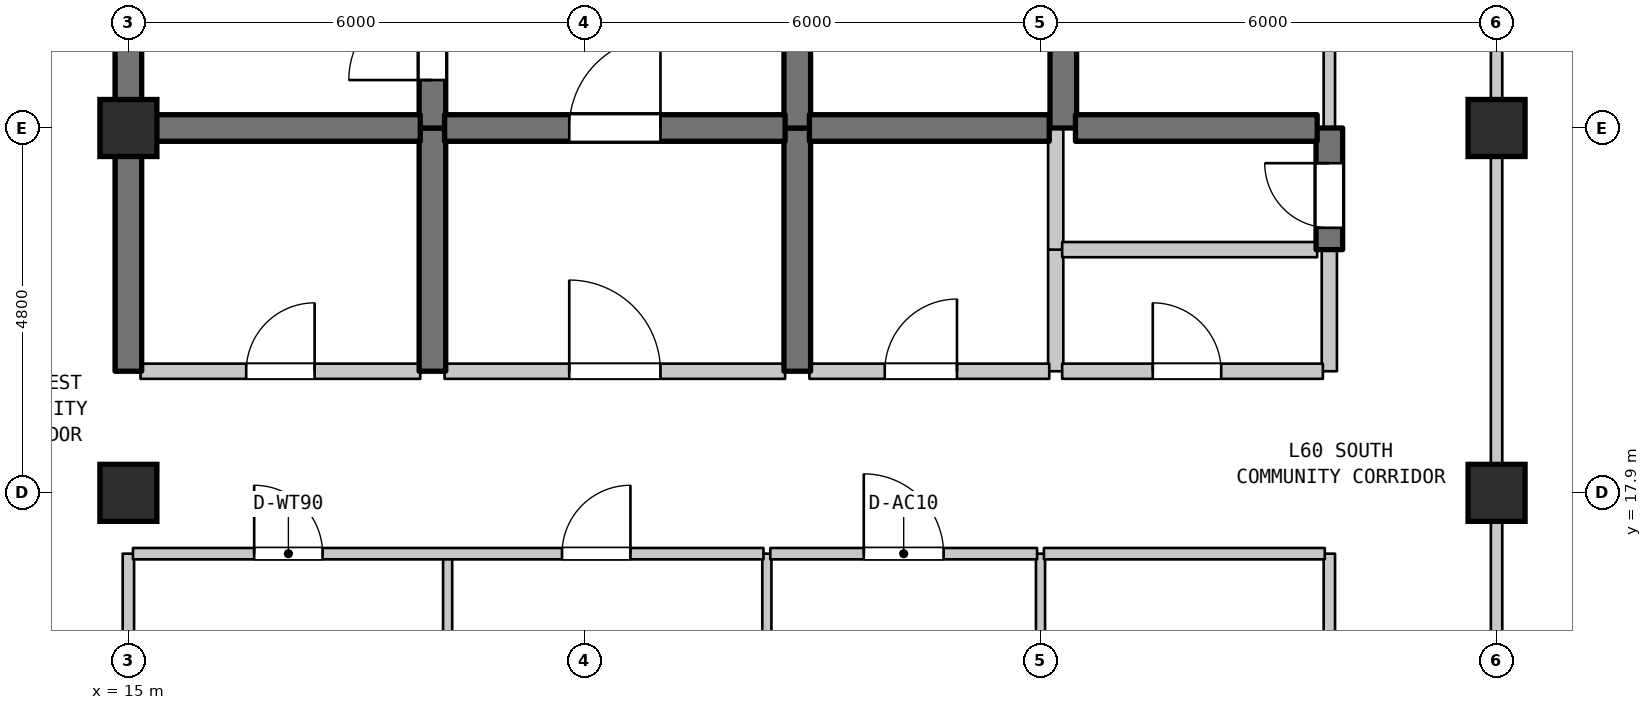
"""IFC4 building model, lengths in metres.
Left out: names, types, materials, properties, quantities, classifications, styles, units other than length and angle.
Written with IfcOpenShell. Run it as: python <this file> out.ifc"""

import sys

from ifc_helpers import new_model, si_unit, direction, frame, frame_2d, origin, origin_2d, place, context, subcontext, project, spatial, rectangle, extrude, element, fill, save


model = new_model("IFC4")
c1 = context("Model", 3, precision=1e-05, world=origin(), true_north=direction((0.0, 1.0)))
c2 = subcontext(c1, "Body", "Model", "MODEL_VIEW")
j1 = project(units=[si_unit("LENGTHUNIT", "METRE"), si_unit("PLANEANGLEUNIT", "RADIAN")], contexts=[c1])
p1 = place(None, origin())
s1 = spatial("IfcSite", under=j1, at=p1, CompositionType="ELEMENT")
p2 = place(p1, origin())
s2 = spatial("IfcBuilding", under=s1, at=p2, CompositionType="ELEMENT")
p3 = place(p2, frame((0.0, 0.0, 242.8)))
s3 = spatial("IfcBuildingStorey", under=s2, at=p3, CompositionType="ELEMENT", Elevation=242.8)
for number, where, z_axis, x_axis in (
    (1, (15.0, 17.9, 0.0), (0.0, 0.0, 1.0), (1.0, 0.0, 0.0)),
    (2, (15.0, 22.7, 0.0), (0.0, 0.0, 1.0), (1.0, 0.0, 0.0)),
    (3, (33.0, 17.9, 0.0), (0.0, 0.0, 1.0), (1.0, 0.0, 0.0)),
    (4, (33.0, 22.7, 0.0), (0.0, 0.0, 1.0), (1.0, 0.0, 0.0)),
):
    element("IfcColumn", number, at=place(p3, frame(where, z_axis=z_axis, x_axis=x_axis)), inside=s3, PredefinedType="COLUMN", context=c2, shape_type="SweptSolid", body=[
        extrude(rectangle(XDim=0.75, YDim=0.75, at=origin_2d()), origin(), (0.0, 0.0, 1.0), 4.5),
    ])
p4 = place(p3, frame((15.0, 13.0, 0.0), z_axis=(0.0, 0.0, 1.0), x_axis=(0.0, 1.0, 0.0)))
e5 = element("IfcWall", 5, at=p4, inside=s3, PredefinedType="STANDARD", context=c2, shape_type="SweptSolid", body=[
    extrude(rectangle(XDim=4.1, YDim=0.15, at=frame_2d((2.05, 0.0))), origin(), (0.0, 0.0, 1.0), 3.9),
])
p5 = place(p3, frame((15.0, 19.5, 0.0), z_axis=(0.0, 0.0, 1.0), x_axis=(0.0, 1.0, 0.0)))
e6 = element("IfcWall", 6, at=p5, inside=s3, PredefinedType="SHEAR", context=c2, shape_type="SweptSolid", body=[
    extrude(rectangle(XDim=3.2, YDim=0.35, at=frame_2d((1.6, 0.0))), origin(), (0.0, 0.0, 1.0), 4.19),
])
p6 = place(p3, frame((15.0, 22.7, 0.0), z_axis=(0.0, 0.0, 1.0), x_axis=(0.0, 1.0, 0.0)))
e7 = element("IfcWall", 7, at=p6, inside=s3, PredefinedType="SHEAR", context=c2, shape_type="SweptSolid", body=[
    extrude(rectangle(XDim=6.8, YDim=0.35, at=frame_2d((3.4, 0.0))), origin(), (0.0, 0.0, 1.0), 4.19),
])
p7 = place(p3, frame((19.0, 19.5, 0.0), z_axis=(0.0, 0.0, 1.0), x_axis=(0.0, 1.0, 0.0)))
e8 = element("IfcWall", 8, at=p7, inside=s3, PredefinedType="SHEAR", context=c2, shape_type="SweptSolid", body=[
    extrude(rectangle(XDim=3.2, YDim=0.35, at=frame_2d((1.6, 0.0))), origin(), (0.0, 0.0, 1.0), 4.19),
])
p8 = place(p3, frame((19.0, 22.7, 0.0), z_axis=(0.0, 0.0, 1.0), x_axis=(0.0, 1.0, 0.0)))
e9 = element("IfcWall", 9, at=p8, inside=s3, PredefinedType="SHEAR", context=c2, shape_type="SweptSolid", body=[
    extrude(rectangle(XDim=5.5, YDim=0.35, at=frame_2d((2.75, 0.0))), origin(), (0.0, 0.0, 1.0), 4.19),
])
p9 = place(p8, frame((0.631, 0.0, 0.0)))
e10 = element("IfcOpeningElement", 10, at=p9, cuts=e9, PredefinedType="OPENING", context=c2, shape_type="SweptSolid", body=[
    extrude(rectangle(XDim=1.1, YDim=2.15, at=frame_2d((0.55, 1.075))), frame((0.0, 0.185, 0.0), z_axis=(0.0, -1.0, 0.0), x_axis=(1.0, 0.0, 0.0)), (0.0, 0.0, 1.0), 0.37),
])
for number, where, z_axis, x_axis in (
    (11, (19.2, 13.0, 0.0), (0.0, 0.0, 1.0), (0.0, 1.0, 0.0)),
    (12, (23.4, 13.0, 0.0), (0.0, 0.0, 1.0), (0.0, 1.0, 0.0)),
):
    element("IfcWall", number, at=place(p3, frame(where, z_axis=z_axis, x_axis=x_axis)), inside=s3, PredefinedType="PARTITIONING", context=c2, shape_type="SweptSolid", body=[
        extrude(rectangle(XDim=4.1, YDim=0.12, at=frame_2d((2.05, 0.0))), origin(), (0.0, 0.0, 1.0), 4.19),
    ])
p10 = place(p3, frame((23.8, 19.5, 0.0), z_axis=(0.0, 0.0, 1.0), x_axis=(0.0, 1.0, 0.0)))
e13 = element("IfcWall", 13, at=p10, inside=s3, PredefinedType="SHEAR", context=c2, shape_type="SweptSolid", body=[
    extrude(rectangle(XDim=3.2, YDim=0.35, at=frame_2d((1.6, 0.0))), origin(), (0.0, 0.0, 1.0), 4.19),
])
p11 = place(p3, frame((23.8, 22.7, 0.0), z_axis=(0.0, 0.0, 1.0), x_axis=(0.0, 1.0, 0.0)))
e14 = element("IfcWall", 14, at=p11, inside=s3, PredefinedType="SHEAR", context=c2, shape_type="SweptSolid", body=[
    extrude(rectangle(XDim=3.4, YDim=0.35, at=frame_2d((1.7, 0.0))), origin(), (0.0, 0.0, 1.0), 4.19),
])
p12 = place(p11, frame((1.25, 0.0, 0.0)))
e15 = element("IfcOpeningElement", 15, at=p12, cuts=e14, PredefinedType="OPENING", context=c2, shape_type="SweptSolid", body=[
    extrude(rectangle(XDim=0.9, YDim=2.15, at=frame_2d((0.45, 1.075))), frame((0.0, 0.185, 0.0), z_axis=(0.0, -1.0, 0.0), x_axis=(1.0, 0.0, 0.0)), (0.0, 0.0, 1.0), 0.37),
])
p13 = place(p3, frame((27.0, 14.5, 0.0), z_axis=(0.0, 0.0, 1.0), x_axis=(0.0, 1.0, 0.0)))
e16 = element("IfcWall", 16, at=p13, inside=s3, PredefinedType="PARTITIONING", context=c2, shape_type="SweptSolid", body=[
    extrude(rectangle(XDim=2.6, YDim=0.12, at=frame_2d((1.3, 0.0))), origin(), (0.0, 0.0, 1.0), 4.19),
])
p14 = place(p3, frame((27.2, 19.5, 0.0), z_axis=(0.0, 0.0, 1.0), x_axis=(0.0, 1.0, 0.0)))
e17 = element("IfcWall", 17, at=p14, inside=s3, PredefinedType="STANDARD", context=c2, shape_type="SweptSolid", body=[
    extrude(rectangle(XDim=1.6, YDim=0.2, at=frame_2d((0.8, 0.0))), origin(), (0.0, 0.0, 1.0), 4.19),
])
p15 = place(p3, frame((27.2, 21.1, 0.0), z_axis=(0.0, 0.0, 1.0), x_axis=(0.0, 1.0, 0.0)))
e18 = element("IfcWall", 18, at=p15, inside=s3, PredefinedType="STANDARD", context=c2, shape_type="SweptSolid", body=[
    extrude(rectangle(XDim=1.6, YDim=0.2, at=frame_2d((0.8, 0.0))), origin(), (0.0, 0.0, 1.0), 4.19),
])
p16 = place(p3, frame((27.3, 22.7, 0.0), z_axis=(0.0, 0.0, 1.0), x_axis=(0.0, 1.0, 0.0)))
e19 = element("IfcWall", 19, at=p16, inside=s3, PredefinedType="SHEAR", context=c2, shape_type="SweptSolid", body=[
    extrude(rectangle(XDim=2.9, YDim=0.35, at=frame_2d((1.45, 0.0))), origin(), (0.0, 0.0, 1.0), 4.19),
])
p17 = place(p3, frame((30.8, 14.5, 0.0), z_axis=(0.0, 0.0, 1.0), x_axis=(0.0, 1.0, 0.0)))
e20 = element("IfcWall", 20, at=p17, inside=s3, PredefinedType="STANDARD", context=c2, shape_type="SweptSolid", body=[
    extrude(rectangle(XDim=2.6, YDim=0.15, at=frame_2d((1.3, 0.0))), origin(), (0.0, 0.0, 1.0), 4.19),
])
p18 = place(p3, frame((30.8, 19.5, 0.0), z_axis=(0.0, 0.0, 1.0), x_axis=(0.0, 1.0, 0.0)))
e21 = element("IfcWall", 21, at=p18, inside=s3, PredefinedType="STANDARD", context=c2, shape_type="SweptSolid", body=[
    extrude(rectangle(XDim=1.6, YDim=0.2, at=frame_2d((0.8, 0.0))), origin(), (0.0, 0.0, 1.0), 4.19),
])
p19 = place(p3, frame((30.8, 21.1, 0.0), z_axis=(0.0, 0.0, 1.0), x_axis=(0.0, 1.0, 0.0)))
e22 = element("IfcWall", 22, at=p19, inside=s3, PredefinedType="SHEAR", context=c2, shape_type="SweptSolid", body=[
    extrude(rectangle(XDim=1.6, YDim=0.35, at=frame_2d((0.8, 0.0))), origin(), (0.0, 0.0, 1.0), 4.19),
])
p20 = place(p19, frame((0.287, 0.0, 0.0)))
e23 = element("IfcOpeningElement", 23, at=p20, cuts=e22, PredefinedType="OPENING", context=c2, shape_type="SweptSolid", body=[
    extrude(rectangle(XDim=0.85, YDim=2.1, at=frame_2d((0.425, 1.05))), frame((0.0, 0.185, 0.0), z_axis=(0.0, -1.0, 0.0), x_axis=(1.0, 0.0, 0.0)), (0.0, 0.0, 1.0), 0.37),
])
p21 = place(p3, frame((30.8, 22.7, 0.0), z_axis=(0.0, 0.0, 1.0), x_axis=(0.0, 1.0, 0.0)))
e24 = element("IfcWall", 24, at=p21, inside=s3, PredefinedType="STANDARD", context=c2, shape_type="SweptSolid", body=[
    extrude(rectangle(XDim=2.9, YDim=0.15, at=frame_2d((1.45, 0.0))), origin(), (0.0, 0.0, 1.0), 4.19),
])
p22 = place(p3, frame((33.0, 6.71, 0.0), z_axis=(0.0, 0.0, 1.0), x_axis=(0.0, 1.0, 0.0)))
e25 = element("IfcWall", 25, at=p22, inside=s3, PredefinedType="STANDARD", context=c2, shape_type="SweptSolid", body=[
    extrude(rectangle(XDim=19.19, YDim=0.15, at=frame_2d((9.595, 0.0))), origin(), (0.0, 0.0, 1.0), 3.9),
])
p23 = place(p3, frame((15.06, 17.1, 0.0), z_axis=(0.0, 0.0, 1.0), x_axis=(1.0, 0.0, 0.0)))
e26 = element("IfcWall", 26, at=p23, inside=s3, PredefinedType="STANDARD", context=c2, shape_type="SweptSolid", body=[
    extrude(rectangle(XDim=8.295, YDim=0.15, at=frame_2d((4.147, 0.0))), origin(), (0.0, 0.0, 1.0), 4.19),
])
p24 = place(p23, frame((1.595, 0.0, 0.0)))
e27 = element("IfcOpeningElement", 27, at=p24, cuts=e26, PredefinedType="OPENING", context=c2, shape_type="SweptSolid", body=[
    extrude(rectangle(XDim=0.9, YDim=2.1, at=frame_2d((0.45, 1.05))), frame((0.0, 0.085, 0.0), z_axis=(0.0, -1.0, 0.0), x_axis=(1.0, 0.0, 0.0)), (0.0, 0.0, 1.0), 0.17),
])
p25 = place(p23, frame((5.645, 0.0, 0.0)))
e28 = element("IfcOpeningElement", 28, at=p25, cuts=e26, PredefinedType="OPENING", context=c2, shape_type="SweptSolid", body=[
    extrude(rectangle(XDim=0.9, YDim=2.1, at=frame_2d((0.45, 1.05))), frame((0.0, 0.085, 0.0), z_axis=(0.0, -1.0, 0.0), x_axis=(1.0, 0.0, 0.0)), (0.0, 0.0, 1.0), 0.17),
])
p26 = place(p3, frame((23.445, 17.1, 0.0), z_axis=(0.0, 0.0, 1.0), x_axis=(1.0, 0.0, 0.0)))
e29 = element("IfcWall", 29, at=p26, inside=s3, PredefinedType="STANDARD", context=c2, shape_type="SweptSolid", body=[
    extrude(rectangle(XDim=3.51, YDim=0.15, at=frame_2d((1.755, 0.0))), origin(), (0.0, 0.0, 1.0), 4.19),
])
p27 = place(p26, frame((1.23, 0.0, 0.0)))
e30 = element("IfcOpeningElement", 30, at=p27, cuts=e29, PredefinedType="OPENING", context=c2, shape_type="SweptSolid", body=[
    extrude(rectangle(XDim=1.05, YDim=2.15, at=frame_2d((0.525, 1.075))), frame((0.0, 0.085, 0.0), z_axis=(0.0, -1.0, 0.0), x_axis=(1.0, 0.0, 0.0)), (0.0, 0.0, 1.0), 0.17),
])
p28 = place(p3, frame((27.045, 17.1, 0.0), z_axis=(0.0, 0.0, 1.0), x_axis=(1.0, 0.0, 0.0)))
e31 = element("IfcWall", 31, at=p28, inside=s3, PredefinedType="STANDARD", context=c2, shape_type="SweptSolid", body=[
    extrude(rectangle(XDim=3.695, YDim=0.15, at=frame_2d((1.848, 0.0))), origin(), (0.0, 0.0, 1.0), 4.19),
])
p29 = place(p3, frame((15.16, 19.5, 0.0), z_axis=(0.0, 0.0, 1.0), x_axis=(1.0, 0.0, 0.0)))
e32 = element("IfcWall", 32, at=p29, inside=s3, PredefinedType="STANDARD", context=c2, shape_type="SweptSolid", body=[
    extrude(rectangle(XDim=3.68, YDim=0.2, at=frame_2d((1.84, 0.0))), origin(), (0.0, 0.0, 1.0), 4.19),
])
p30 = place(p29, frame((1.39, 0.0, 0.0)))
e33 = element("IfcOpeningElement", 33, at=p30, cuts=e32, PredefinedType="OPENING", context=c2, shape_type="SweptSolid", body=[
    extrude(rectangle(XDim=0.9, YDim=2.15, at=frame_2d((0.45, 1.075))), frame((0.0, 0.11, 0.0), z_axis=(0.0, -1.0, 0.0), x_axis=(1.0, 0.0, 0.0)), (0.0, 0.0, 1.0), 0.22),
])
p31 = place(p3, frame((19.16, 19.5, 0.0), z_axis=(0.0, 0.0, 1.0), x_axis=(1.0, 0.0, 0.0)))
e34 = element("IfcWall", 34, at=p31, inside=s3, PredefinedType="STANDARD", context=c2, shape_type="SweptSolid", body=[
    extrude(rectangle(XDim=4.48, YDim=0.2, at=frame_2d((2.24, 0.0))), origin(), (0.0, 0.0, 1.0), 4.19),
])
p32 = place(p31, frame((1.64, 0.0, 0.0)))
e35 = element("IfcOpeningElement", 35, at=p32, cuts=e34, PredefinedType="OPENING", context=c2, shape_type="SweptSolid", body=[
    extrude(rectangle(XDim=1.2, YDim=2.2, at=frame_2d((0.6, 1.1))), frame((0.0, 0.11, 0.0), z_axis=(0.0, -1.0, 0.0), x_axis=(1.0, 0.0, 0.0)), (0.0, 0.0, 1.0), 0.22),
])
p33 = place(p3, frame((23.96, 19.5, 0.0), z_axis=(0.0, 0.0, 1.0), x_axis=(1.0, 0.0, 0.0)))
e36 = element("IfcWall", 36, at=p33, inside=s3, PredefinedType="STANDARD", context=c2, shape_type="SweptSolid", body=[
    extrude(rectangle(XDim=3.155, YDim=0.2, at=frame_2d((1.578, 0.0))), origin(), (0.0, 0.0, 1.0), 4.19),
])
p34 = place(p33, frame((0.991, 0.0, 0.0)))
e37 = element("IfcOpeningElement", 37, at=p34, cuts=e36, PredefinedType="OPENING", context=c2, shape_type="SweptSolid", body=[
    extrude(rectangle(XDim=0.95, YDim=2.15, at=frame_2d((0.475, 1.075))), frame((0.0, 0.11, 0.0), z_axis=(0.0, -1.0, 0.0), x_axis=(1.0, 0.0, 0.0)), (0.0, 0.0, 1.0), 0.22),
])
p35 = place(p3, frame((27.285, 19.5, 0.0), z_axis=(0.0, 0.0, 1.0), x_axis=(1.0, 0.0, 0.0)))
e38 = element("IfcWall", 38, at=p35, inside=s3, PredefinedType="STANDARD", context=c2, shape_type="SweptSolid", body=[
    extrude(rectangle(XDim=3.43, YDim=0.2, at=frame_2d((1.715, 0.0))), origin(), (0.0, 0.0, 1.0), 4.19),
])
p36 = place(p35, frame((1.192, 0.0, 0.0)))
e39 = element("IfcOpeningElement", 39, at=p36, cuts=e38, PredefinedType="OPENING", context=c2, shape_type="SweptSolid", body=[
    extrude(rectangle(XDim=0.9, YDim=2.15, at=frame_2d((0.45, 1.075))), frame((0.0, 0.11, 0.0), z_axis=(0.0, -1.0, 0.0), x_axis=(1.0, 0.0, 0.0)), (0.0, 0.0, 1.0), 0.22),
])
p37 = place(p3, frame((27.285, 21.1, 0.0), z_axis=(0.0, 0.0, 1.0), x_axis=(1.0, 0.0, 0.0)))
e40 = element("IfcWall", 40, at=p37, inside=s3, PredefinedType="STANDARD", context=c2, shape_type="SweptSolid", body=[
    extrude(rectangle(XDim=3.355, YDim=0.2, at=frame_2d((1.677, 0.0))), origin(), (0.0, 0.0, 1.0), 4.19),
])
p38 = place(p3, frame((15.16, 22.7, 0.0), z_axis=(0.0, 0.0, 1.0), x_axis=(1.0, 0.0, 0.0)))
e41 = element("IfcWall", 41, at=p38, inside=s3, PredefinedType="SHEAR", context=c2, shape_type="SweptSolid", body=[
    extrude(rectangle(XDim=3.68, YDim=0.35, at=frame_2d((1.84, 0.0))), origin(), (0.0, 0.0, 1.0), 4.19),
])
p39 = place(p3, frame((19.16, 22.7, 0.0), z_axis=(0.0, 0.0, 1.0), x_axis=(1.0, 0.0, 0.0)))
e42 = element("IfcWall", 42, at=p39, inside=s3, PredefinedType="SHEAR", context=c2, shape_type="SweptSolid", body=[
    extrude(rectangle(XDim=4.48, YDim=0.35, at=frame_2d((2.24, 0.0))), origin(), (0.0, 0.0, 1.0), 4.19),
])
p40 = place(p39, frame((1.64, 0.0, 0.0)))
e43 = element("IfcOpeningElement", 43, at=p40, cuts=e42, PredefinedType="OPENING", context=c2, shape_type="SweptSolid", body=[
    extrude(rectangle(XDim=1.2, YDim=2.2, at=frame_2d((0.6, 1.1))), frame((0.0, 0.185, 0.0), z_axis=(0.0, -1.0, 0.0), x_axis=(1.0, 0.0, 0.0)), (0.0, 0.0, 1.0), 0.37),
])
p41 = place(p3, frame((23.96, 22.7, 0.0), z_axis=(0.0, 0.0, 1.0), x_axis=(1.0, 0.0, 0.0)))
e44 = element("IfcWall", 44, at=p41, inside=s3, PredefinedType="SHEAR", context=c2, shape_type="SweptSolid", body=[
    extrude(rectangle(XDim=3.155, YDim=0.35, at=frame_2d((1.578, 0.0))), origin(), (0.0, 0.0, 1.0), 4.19),
])
p42 = place(p3, frame((27.46, 22.7, 0.0), z_axis=(0.0, 0.0, 1.0), x_axis=(1.0, 0.0, 0.0)))
e45 = element("IfcWall", 45, at=p42, inside=s3, PredefinedType="SHEAR", context=c2, shape_type="SweptSolid", body=[
    extrude(rectangle(XDim=3.18, YDim=0.35, at=frame_2d((1.59, 0.0))), origin(), (0.0, 0.0, 1.0), 4.19),
])
p43 = place(p9, origin())
e46 = element("IfcDoor", 46, at=p43, inside=s3, OperationType="SINGLE_SWING_LEFT", PredefinedType="DOOR", context=c2, shape_type="SweptSolid", body=[
    extrude(rectangle(XDim=1.1, YDim=2.15, at=frame_2d((0.55, 1.075))), frame((0.0, 0.025, 0.0), z_axis=(0.0, -1.0, 0.0), x_axis=(1.0, 0.0, 0.0)), (0.0, 0.0, 1.0), 0.05),
])
fill(e10, e46)
p44 = place(p20, origin())
e47 = element("IfcDoor", 47, at=p44, inside=s3, OperationType="SINGLE_SWING_RIGHT", PredefinedType="DOOR", context=c2, shape_type="SweptSolid", body=[
    extrude(rectangle(XDim=0.85, YDim=2.1, at=frame_2d((0.425, 1.05))), frame((0.0, 0.025, 0.0), z_axis=(0.0, -1.0, 0.0), x_axis=(1.0, 0.0, 0.0)), (0.0, 0.0, 1.0), 0.05),
])
fill(e23, e47)
p45 = place(p24, origin())
e48 = element("IfcDoor", 48, at=p45, inside=s3, OperationType="SINGLE_SWING_LEFT", PredefinedType="DOOR", context=c2, shape_type="SweptSolid", body=[
    extrude(rectangle(XDim=0.9, YDim=2.1, at=frame_2d((0.45, 1.05))), frame((0.0, 0.025, 0.0), z_axis=(0.0, -1.0, 0.0), x_axis=(1.0, 0.0, 0.0)), (0.0, 0.0, 1.0), 0.05),
])
fill(e27, e48)
p46 = place(p25, origin())
e49 = element("IfcDoor", 49, at=p46, inside=s3, OperationType="SINGLE_SWING_RIGHT", PredefinedType="DOOR", context=c2, shape_type="SweptSolid", body=[
    extrude(rectangle(XDim=0.9, YDim=2.1, at=frame_2d((0.45, 1.05))), frame((0.0, 0.025, 0.0), z_axis=(0.0, -1.0, 0.0), x_axis=(1.0, 0.0, 0.0)), (0.0, 0.0, 1.0), 0.05),
])
fill(e28, e49)
p47 = place(p27, origin())
e50 = element("IfcDoor", 50, at=p47, inside=s3, OperationType="SINGLE_SWING_LEFT", PredefinedType="DOOR", context=c2, shape_type="SweptSolid", body=[
    extrude(rectangle(XDim=1.05, YDim=2.15, at=frame_2d((0.525, 1.075))), frame((0.0, 0.025, 0.0), z_axis=(0.0, -1.0, 0.0), x_axis=(1.0, 0.0, 0.0)), (0.0, 0.0, 1.0), 0.05),
])
fill(e30, e50)
p48 = place(p30, origin())
e51 = element("IfcDoor", 51, at=p48, inside=s3, OperationType="SINGLE_SWING_RIGHT", PredefinedType="DOOR", context=c2, shape_type="SweptSolid", body=[
    extrude(rectangle(XDim=0.9, YDim=2.15, at=frame_2d((0.45, 1.075))), frame((0.0, 0.025, 0.0), z_axis=(0.0, -1.0, 0.0), x_axis=(1.0, 0.0, 0.0)), (0.0, 0.0, 1.0), 0.05),
])
fill(e33, e51)
p49 = place(p32, origin())
e52 = element("IfcDoor", 52, at=p49, inside=s3, OperationType="SINGLE_SWING_LEFT", PredefinedType="DOOR", context=c2, shape_type="SweptSolid", body=[
    extrude(rectangle(XDim=1.2, YDim=2.2, at=frame_2d((0.6, 1.1))), frame((0.0, 0.025, 0.0), z_axis=(0.0, -1.0, 0.0), x_axis=(1.0, 0.0, 0.0)), (0.0, 0.0, 1.0), 0.05),
])
fill(e35, e52)
p50 = place(p34, origin())
e53 = element("IfcDoor", 53, at=p50, inside=s3, OperationType="SINGLE_SWING_RIGHT", PredefinedType="DOOR", context=c2, shape_type="SweptSolid", body=[
    extrude(rectangle(XDim=0.95, YDim=2.15, at=frame_2d((0.475, 1.075))), frame((0.0, 0.025, 0.0), z_axis=(0.0, -1.0, 0.0), x_axis=(1.0, 0.0, 0.0)), (0.0, 0.0, 1.0), 0.05),
])
fill(e37, e53)
p51 = place(p36, origin())
e54 = element("IfcDoor", 54, at=p51, inside=s3, OperationType="SINGLE_SWING_LEFT", PredefinedType="DOOR", context=c2, shape_type="SweptSolid", body=[
    extrude(rectangle(XDim=0.9, YDim=2.15, at=frame_2d((0.45, 1.075))), frame((0.0, 0.025, 0.0), z_axis=(0.0, -1.0, 0.0), x_axis=(1.0, 0.0, 0.0)), (0.0, 0.0, 1.0), 0.05),
])
fill(e39, e54)
p52 = place(p40, origin())
e55 = element("IfcDoor", 55, at=p52, inside=s3, OperationType="SINGLE_SWING_RIGHT", PredefinedType="DOOR", context=c2, shape_type="SweptSolid", body=[
    extrude(rectangle(XDim=1.2, YDim=2.2, at=frame_2d((0.6, 1.1))), frame((0.0, 0.025, 0.0), z_axis=(0.0, -1.0, 0.0), x_axis=(1.0, 0.0, 0.0)), (0.0, 0.0, 1.0), 0.05),
])
fill(e43, e55)
save(model, sys.argv[1])
